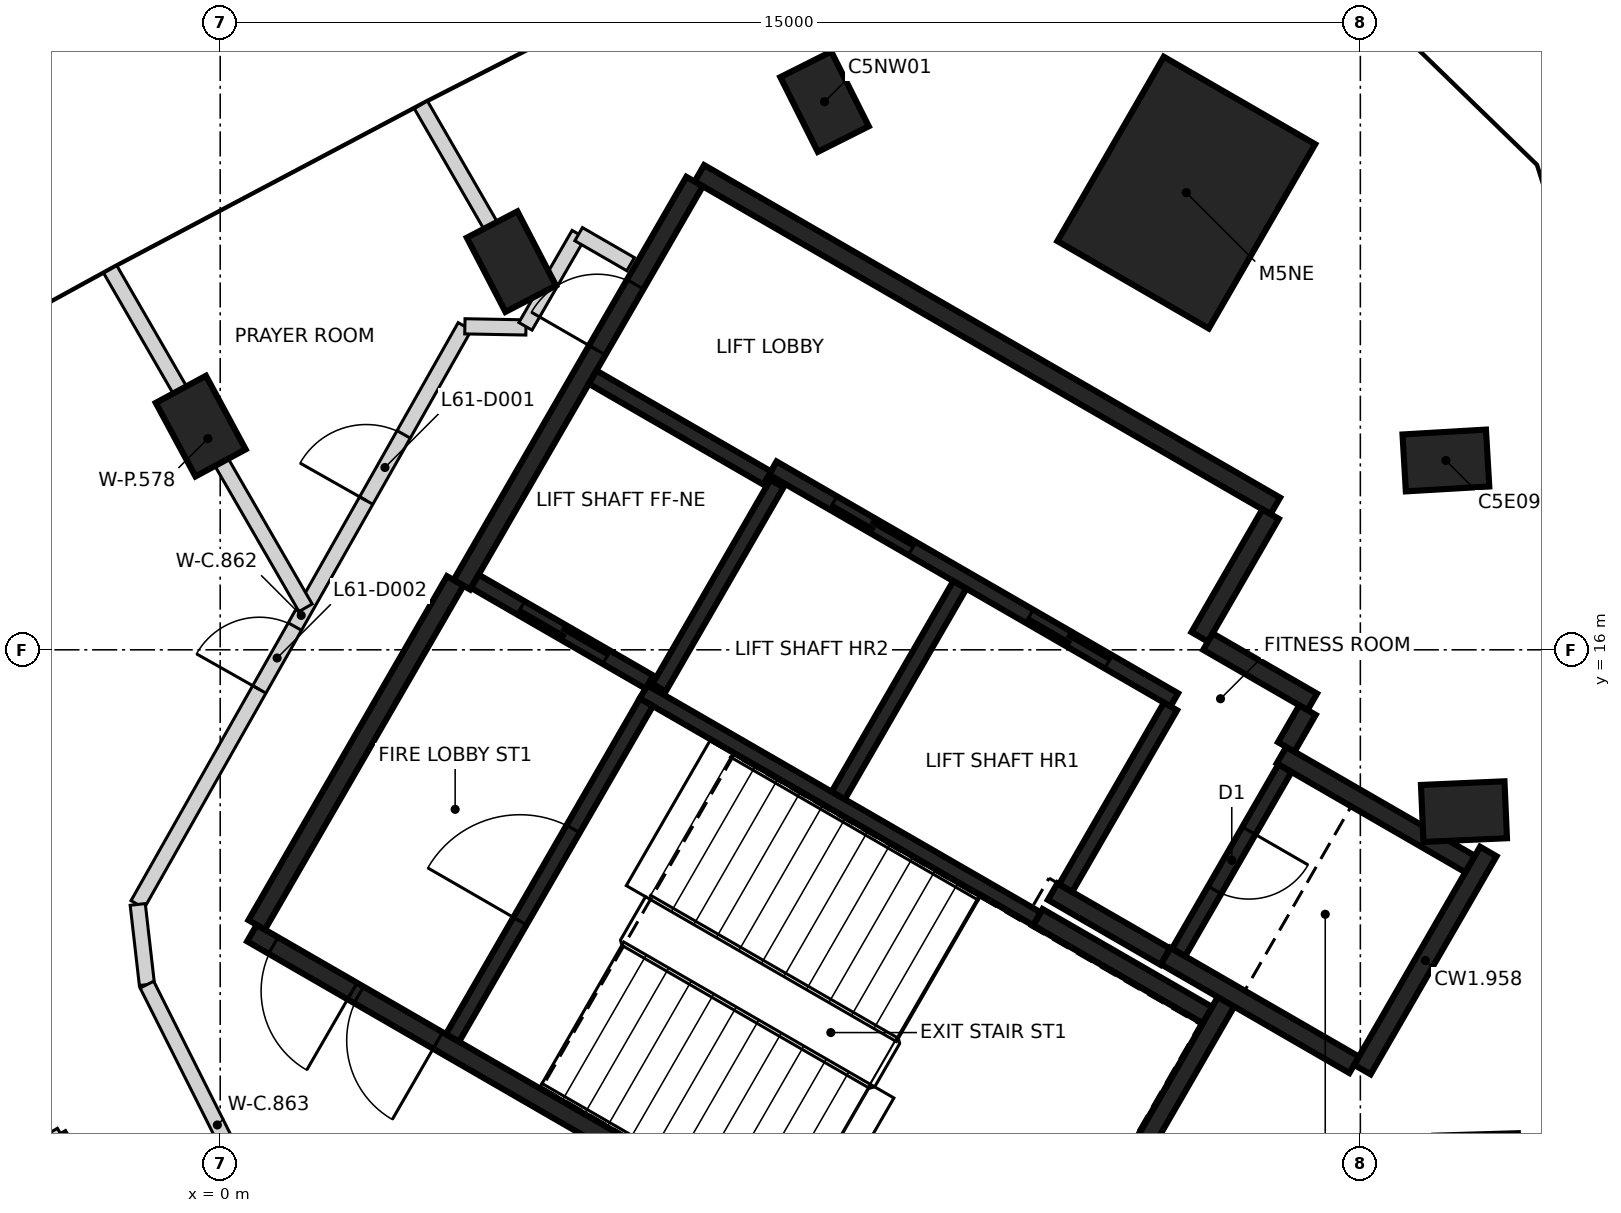
"""IFC4 building model, lengths in metres.
Left out: names, types, materials, properties, quantities, classifications, styles, units other than length and angle.
Written with IfcOpenShell. Run it as: python <this file> out.ifc"""

import sys

from ifc_helpers import new_model, si_unit, direction, frame, frame_2d, origin, origin_2d, place, context, subcontext, project, spatial, rectangle, extrude, element, fill, save


model = new_model("IFC4")
c1 = context("Model", 3, precision=1e-05, world=origin(), true_north=direction((0.0, 1.0)))
c2 = subcontext(c1, "Body", "Model", "MODEL_VIEW")
j1 = project(units=[si_unit("LENGTHUNIT", "METRE"), si_unit("PLANEANGLEUNIT", "RADIAN")], contexts=[c1])
p1 = place(None, origin())
s1 = spatial("IfcSite", under=j1, at=p1, CompositionType="ELEMENT")
p2 = place(p1, origin())
s2 = spatial("IfcBuilding", under=s1, at=p2, CompositionType="ELEMENT")
p3 = place(p2, frame((0.0, 0.0, 243.0)))
s3 = spatial("IfcBuildingStorey", under=s2, at=p3, CompositionType="ELEMENT", Elevation=243.0)
for number, where, z_axis, x_axis in (
    (1, (16.363, 13.872, -0.35), (0.0, 0.0, 1.0), (0.999, 0.044, 0.0)),
    (2, (16.125, 18.491, -0.35), (0.0, 0.0, 1.0), (0.998, 0.058, 0.0)),
    (3, (7.951, 23.211, -0.35), (0.0, 0.0, 1.0), (-0.449, 0.894, 0.0)),
    (4, (3.832, 21.107, -0.35), (0.0, 0.0, 1.0), (-0.461, 0.887, 0.0)),
    (5, (-0.256, 18.943, -0.35), (0.0, 0.0, 1.0), (-0.475, 0.88, 0.0)),
):
    element("IfcColumn", number, at=place(p3, frame(where, z_axis=z_axis, x_axis=x_axis)), inside=s3, PredefinedType="COLUMN", context=c2, shape_type="SweptSolid", body=[
        extrude(rectangle(XDim=1.1, YDim=0.75, at=origin_2d()), origin(), (0.0, 0.0, 1.0), 3.6),
    ])
p4 = place(p3, frame((12.71, 22.015, -0.35), z_axis=(0.0, 0.0, 1.0), x_axis=(0.5, 0.866025403784, 0.0)))
e6 = element("IfcColumn", 6, at=p4, inside=s3, PredefinedType="COLUMN", context=c2, shape_type="SweptSolid", body=[
    extrude(rectangle(XDim=2.8, YDim=2.3, at=origin_2d()), origin(), (0.0, 0.0, 1.0), 3.6),
])
p5 = place(p3, frame((10.42, 6.498, 0.0), z_axis=(0.0, 0.0, 1.0), x_axis=(-0.866021906294, 0.500006057782, 0.0)))
e7 = element("IfcWall", 7, at=p5, inside=s3, PredefinedType="SHEAR", context=c2, shape_type="SweptSolid", body=[
    extrude(rectangle(XDim=11.55, YDim=0.25, at=frame_2d((5.775, 0.0))), origin(), (0.0, 0.0, 1.0), 3.25),
])
p6 = place(p5, frame((10.025, 0.0, 0.0)))
e8 = element("IfcOpeningElement", 8, at=p6, cuts=e7, PredefinedType="OPENING", context=c2, shape_type="SweptSolid", body=[
    extrude(rectangle(XDim=1.2, YDim=2.1, at=frame_2d((0.6, 1.05))), frame((0.0, 0.135, 0.0), z_axis=(0.0, -1.0, 0.0), x_axis=(1.0, 0.0, 0.0)), (0.0, 0.0, 1.0), 0.27),
])
p7 = place(p5, frame((8.725, 0.0, 0.0)))
e9 = element("IfcOpeningElement", 9, at=p7, cuts=e7, PredefinedType="OPENING", context=c2, shape_type="SweptSolid", body=[
    extrude(rectangle(XDim=1.2, YDim=2.1, at=frame_2d((0.6, 1.05))), frame((0.0, 0.135, 0.0), z_axis=(0.0, -1.0, 0.0), x_axis=(1.0, 0.0, 0.0)), (0.0, 0.0, 1.0), 0.27),
])
p8 = place(p3, frame((6.304, 22.269, 0.0), z_axis=(0.0, 0.0, 1.0), x_axis=(0.866022959057, -0.500004234368, 0.0)))
e10 = element("IfcWall", 10, at=p8, inside=s3, PredefinedType="SHEAR", context=c2, shape_type="SweptSolid", body=[
    extrude(rectangle(XDim=8.75, YDim=0.25, at=frame_2d((4.375, 0.0))), origin(), (0.0, 0.0, 1.0), 3.25),
])
p9 = place(p3, frame((3.179, 16.856, 0.0), z_axis=(0.0, 0.0, 1.0), x_axis=(0.500001955336, 0.866024274868, 0.0)))
e11 = element("IfcWall", 11, at=p9, inside=s3, PredefinedType="SHEAR", context=c2, shape_type="SweptSolid", body=[
    extrude(rectangle(XDim=6.125, YDim=0.25, at=frame_2d((3.062, 0.0))), origin(), (0.0, 0.0, 1.0), 3.25),
])
p10 = place(p9, frame((3.563, 0.0, 0.0)))
e12 = element("IfcOpeningElement", 12, at=p10, cuts=e11, PredefinedType="OPENING", context=c2, shape_type="SweptSolid", body=[
    extrude(rectangle(XDim=1.0, YDim=2.1, at=frame_2d((0.5, 1.05))), frame((0.0, 0.135, 0.0), z_axis=(0.0, -1.0, 0.0), x_axis=(1.0, 0.0, 0.0)), (0.0, 0.0, 1.0), 0.27),
])
p11 = place(p3, frame((0.48, 12.381, 0.0), z_axis=(0.0, 0.0, 1.0), x_axis=(0.49999885962, 0.866026062182, 0.0)))
e13 = element("IfcWall", 13, at=p11, inside=s3, PredefinedType="SHEAR", context=c2, shape_type="SweptSolid", body=[
    extrude(rectangle(XDim=5.225, YDim=0.25, at=frame_2d((2.612, 0.0))), origin(), (0.0, 0.0, 1.0), 3.25),
])
p12 = place(p3, frame((13.238, 11.378, 0.0), z_axis=(0.0, 0.0, 1.0), x_axis=(-0.500008851346, -0.866020293397, 0.0)))
e14 = element("IfcWall", 14, at=p12, inside=s3, PredefinedType="SHEAR", context=c2, shape_type="SweptSolid", body=[
    extrude(rectangle(XDim=5.51, YDim=0.25, at=frame_2d((2.755, 0.0))), origin(), (0.0, 0.0, 1.0), 3.25),
])
p13 = place(p3, frame((16.684, 13.347, 0.0), z_axis=(0.0, 0.0, 1.0), x_axis=(-0.499998874531, -0.866026053573, 0.0)))
e15 = element("IfcWall", 15, at=p13, inside=s3, PredefinedType="SHEAR", context=c2, shape_type="SweptSolid", body=[
    extrude(rectangle(XDim=3.313, YDim=0.25, at=frame_2d((1.656, 0.0))), origin(), (0.0, 0.0, 1.0), 3.25),
])
p14 = place(p3, frame((14.918, 10.54, 0.0), z_axis=(0.0, 0.0, 1.0), x_axis=(-0.866063538972, 0.499933942099, 0.0)))
e16 = element("IfcWall", 16, at=p14, inside=s3, PredefinedType="SHEAR", context=c2, shape_type="SweptSolid", body=[
    extrude(rectangle(XDim=2.865, YDim=0.25, at=frame_2d((1.432, 0.0))), origin(), (0.0, 0.0, 1.0), 3.25),
])
p15 = place(p3, frame((13.963, 14.614, 0.0), z_axis=(0.0, 0.0, 1.0), x_axis=(0.866042235819, -0.499970844928, 0.0)))
e17 = element("IfcWall", 17, at=p15, inside=s3, PredefinedType="SHEAR", context=c2, shape_type="SweptSolid", body=[
    extrude(rectangle(XDim=2.865, YDim=0.25, at=frame_2d((1.432, 0.0))), origin(), (0.0, 0.0, 1.0), 3.25),
])
p16 = place(p3, frame((10.757, 12.481, 0.0), z_axis=(0.0, 0.0, 1.0), x_axis=(0.866022940537, -0.500004266446, 0.0)))
e18 = element("IfcWall", 18, at=p16, inside=s3, PredefinedType="SHEAR", context=c2, shape_type="SweptSolid", body=[
    extrude(rectangle(XDim=2.575, YDim=0.25, at=frame_2d((1.287, 0.0))), origin(), (0.0, 0.0, 1.0), 3.25),
])
p17 = place(p3, frame((13.819, 17.785, 0.0), z_axis=(0.0, 0.0, 1.0), x_axis=(-0.500039802285, -0.866002422705, 0.0)))
e19 = element("IfcWall", 19, at=p17, inside=s3, PredefinedType="SHEAR", context=c2, shape_type="SweptSolid", body=[
    extrude(rectangle(XDim=1.865, YDim=0.25, at=frame_2d((0.932, 0.0))), origin(), (0.0, 0.0, 1.0), 3.25),
])
p18 = place(p3, frame((12.433, 11.964, 0.0), z_axis=(0.0, 0.0, 1.0), x_axis=(-0.866038183914, 0.499977863513, 0.0)))
e20 = element("IfcWall", 20, at=p18, inside=s3, PredefinedType="SHEAR", context=c2, shape_type="SweptSolid", body=[
    extrude(rectangle(XDim=1.71, YDim=0.25, at=frame_2d((0.855, 0.0))), origin(), (0.0, 0.0, 1.0), 3.25),
])
p19 = place(p3, frame((12.995, 16.108, 0.0), z_axis=(0.0, 0.0, 1.0), x_axis=(0.866044474677, -0.49996696679, 0.0)))
e21 = element("IfcWall", 21, at=p19, inside=s3, PredefinedType="SHEAR", context=c2, shape_type="SweptSolid", body=[
    extrude(rectangle(XDim=1.584, YDim=0.25, at=frame_2d((0.792, 0.0))), origin(), (0.0, 0.0, 1.0), 3.25),
])
p20 = place(p3, frame((14.305, 15.207, 0.0), z_axis=(0.0, 0.0, 1.0), x_axis=(-0.499848422343, -0.866112899501, 0.0)))
e22 = element("IfcWall", 22, at=p20, inside=s3, PredefinedType="SHEAR", context=c2, shape_type="SweptSolid", body=[
    extrude(rectangle(XDim=0.559, YDim=0.25, at=frame_2d((0.28, 0.0))), origin(), (0.0, 0.0, 1.0), 3.25),
])
p21 = place(p3, frame((12.552, 15.342, 0.0), z_axis=(0.0, 0.0, 1.0), x_axis=(-0.866030299012, 0.499991521122, 0.0)))
e23 = element("IfcWall", 23, at=p21, inside=s3, PredefinedType="SHEAR", context=c2, shape_type="SweptSolid", body=[
    extrude(rectangle(XDim=6.1, YDim=0.2, at=frame_2d((3.05, 0.0))), origin(), (0.0, 0.0, 1.0), 3.25),
])
p22 = place(p21, frame((1.0, 0.0, 0.0)))
e24 = element("IfcOpeningElement", 24, at=p22, cuts=e23, PredefinedType="OPENING", context=c2, shape_type="SweptSolid", body=[
    extrude(rectangle(XDim=1.2, YDim=2.1, at=frame_2d((0.6, 1.05))), frame((0.0, 0.11, 0.0), z_axis=(0.0, -1.0, 0.0), x_axis=(1.0, 0.0, 0.0)), (0.0, 0.0, 1.0), 0.22),
])
p23 = place(p21, frame((3.982, 0.0, 0.0)))
e25 = element("IfcOpeningElement", 25, at=p23, cuts=e23, PredefinedType="OPENING", context=c2, shape_type="SweptSolid", body=[
    extrude(rectangle(XDim=1.2, YDim=2.1, at=frame_2d((0.6, 1.05))), frame((0.0, 0.11, 0.0), z_axis=(0.0, -1.0, 0.0), x_axis=(1.0, 0.0, 0.0)), (0.0, 0.0, 1.0), 0.22),
])
p24 = place(p3, frame((10.743, 12.46, 0.0), z_axis=(0.0, 0.0, 1.0), x_axis=(-0.866018848283, 0.500011354289, 0.0)))
e26 = element("IfcWall", 26, at=p24, inside=s3, PredefinedType="SHEAR", context=c2, shape_type="SweptSolid", body=[
    extrude(rectangle(XDim=5.974, YDim=0.2, at=frame_2d((2.987, 0.0))), origin(), (0.0, 0.0, 1.0), 3.25),
])
p25 = place(p3, frame((3.057, 10.895, 0.0), z_axis=(0.0, 0.0, 1.0), x_axis=(0.500027839223, 0.866009330205, 0.0)))
e27 = element("IfcWall", 27, at=p25, inside=s3, PredefinedType="SHEAR", context=c2, shape_type="SweptSolid", body=[
    extrude(rectangle(XDim=5.098, YDim=0.2, at=frame_2d((2.549, 0.0))), origin(), (0.0, 0.0, 1.0), 3.25),
])
p26 = place(p25, frame((1.774, 0.0, 0.0)))
e28 = element("IfcOpeningElement", 28, at=p26, cuts=e27, PredefinedType="OPENING", context=c2, shape_type="SweptSolid", body=[
    extrude(rectangle(XDim=1.4, YDim=2.1, at=frame_2d((0.7, 1.05))), frame((0.0, 0.11, 0.0), z_axis=(0.0, -1.0, 0.0), x_axis=(1.0, 0.0, 0.0)), (0.0, 0.0, 1.0), 0.22),
])
p27 = place(p3, frame((8.132, 14.084, 0.0), z_axis=(0.0, 0.0, 1.0), x_axis=(0.500030834389, 0.86600760081, 0.0)))
e29 = element("IfcWall", 29, at=p27, inside=s3, PredefinedType="SHEAR", context=c2, shape_type="SweptSolid", body=[
    extrude(rectangle(XDim=3.198, YDim=0.2, at=frame_2d((1.599, 0.0))), origin(), (0.0, 0.0, 1.0), 3.25),
])
p28 = place(p3, frame((14.008, 14.442, 0.0), z_axis=(0.0, 0.0, 1.0), x_axis=(-0.499986818241, -0.866033014143, 0.0)))
e30 = element("IfcWall", 30, at=p28, inside=s3, PredefinedType="SHEAR", context=c2, shape_type="SweptSolid", body=[
    extrude(rectangle(XDim=2.798, YDim=0.2, at=frame_2d((1.399, 0.0))), origin(), (0.0, 0.0, 1.0), 3.25),
])
p29 = place(p28, frame((0.949, 0.0, 0.0)))
e31 = element("IfcOpeningElement", 31, at=p29, cuts=e30, PredefinedType="OPENING", context=c2, shape_type="SweptSolid", body=[
    extrude(rectangle(XDim=0.9, YDim=2.1, at=frame_2d((0.45, 1.05))), frame((0.0, 0.11, 0.0), z_axis=(0.0, -1.0, 0.0), x_axis=(1.0, 0.0, 0.0)), (0.0, 0.0, 1.0), 0.22),
])
p30 = place(p3, frame((12.502, 15.255, 0.0), z_axis=(0.0, 0.0, 1.0), x_axis=(-0.499965018551, -0.866045599391, 0.0)))
e32 = element("IfcWall", 32, at=p30, inside=s3, PredefinedType="SHEAR", context=c2, shape_type="SweptSolid", body=[
    extrude(rectangle(XDim=2.759, YDim=0.2, at=frame_2d((1.379, 0.0))), origin(), (0.0, 0.0, 1.0), 3.25),
])
p31 = place(p3, frame((7.324, 18.187, 0.0), z_axis=(0.0, 0.0, 1.0), x_axis=(-0.499967891604, -0.866043940782, 0.0)))
e33 = element("IfcWall", 33, at=p31, inside=s3, PredefinedType="SHEAR", context=c2, shape_type="SweptSolid", body=[
    extrude(rectangle(XDim=3.1, YDim=0.2, at=frame_2d((1.55, 0.0))), origin(), (0.0, 0.0, 1.0), 3.25),
])
p32 = place(p3, frame((5.646, 15.576, 0.0), z_axis=(0.0, 0.0, 1.0), x_axis=(-0.866018407898, 0.500012117035, 0.0)))
e34 = element("IfcWall", 34, at=p32, inside=s3, PredefinedType="SHEAR", context=c2, shape_type="SweptSolid", body=[
    extrude(rectangle(XDim=2.651, YDim=0.2, at=frame_2d((1.325, 0.0))), origin(), (0.0, 0.0, 1.0), 3.25),
])
p33 = place(p32, frame((0.652, 0.0, 0.0)))
e35 = element("IfcOpeningElement", 35, at=p33, cuts=e34, PredefinedType="OPENING", context=c2, shape_type="SweptSolid", body=[
    extrude(rectangle(XDim=1.3, YDim=2.1, at=frame_2d((0.65, 1.05))), frame((0.0, 0.11, 0.0), z_axis=(0.0, -1.0, 0.0), x_axis=(1.0, 0.0, 0.0)), (0.0, 0.0, 1.0), 0.22),
])
p34 = place(p3, frame((7.196, 18.26, 0.0), z_axis=(0.0, 0.0, 1.0), x_axis=(-0.866018407898, 0.500012117035, 0.0)))
e36 = element("IfcWall", 36, at=p34, inside=s3, PredefinedType="SHEAR", context=c2, shape_type="SweptSolid", body=[
    extrude(rectangle(XDim=2.651, YDim=0.2, at=frame_2d((1.325, 0.0))), origin(), (0.0, 0.0, 1.0), 3.25),
])
p35 = place(p3, frame((-1.086, 12.651, 0.0), z_axis=(0.0, 0.0, 1.0), x_axis=(0.492590234691, 0.870261374925, 0.0)))
e37 = element("IfcWall", 37, at=p35, inside=s3, PredefinedType="PARTITIONING", context=c2, shape_type="SweptSolid", body=[
    extrude(rectangle(XDim=8.738, YDim=0.2, at=frame_2d((4.369, 0.0))), origin(), (0.0, 0.0, 1.0), 3.25),
])
p36 = place(p35, frame((6.105, 0.0, 0.0)))
e38 = element("IfcOpeningElement", 38, at=p36, cuts=e37, PredefinedType="OPENING", context=c2, shape_type="SweptSolid", body=[
    extrude(rectangle(XDim=1.0, YDim=2.1, at=frame_2d((0.5, 1.05))), frame((0.0, 0.11, 0.0), z_axis=(0.0, -1.0, 0.0), x_axis=(1.0, 0.0, 0.0)), (0.0, 0.0, 1.0), 0.22),
])
p37 = place(p35, frame((3.25, 0.0, 0.0)))
e39 = element("IfcOpeningElement", 39, at=p37, cuts=e37, PredefinedType="OPENING", context=c2, shape_type="SweptSolid", body=[
    extrude(rectangle(XDim=0.95, YDim=2.1, at=frame_2d((0.475, 1.05))), frame((0.0, 0.11, 0.0), z_axis=(0.0, -1.0, 0.0), x_axis=(1.0, 0.0, 0.0)), (0.0, 0.0, 1.0), 0.22),
])
p38 = place(p3, frame((-1.085, 12.65, 0.0), z_axis=(0.0, 0.0, 1.0), x_axis=(0.113812454263, -0.993502252264, 0.0)))
e40 = element("IfcWall", 40, at=p38, inside=s3, PredefinedType="PARTITIONING", context=c2, shape_type="SweptSolid", body=[
    extrude(rectangle(XDim=1.062, YDim=0.2, at=frame_2d((0.531, 0.0))), origin(), (0.0, 0.0, 1.0), 3.25),
])
p39 = place(p3, frame((-0.964, 11.595, 0.0), z_axis=(0.0, 0.0, 1.0), x_axis=(0.448584236569, -0.893740556706, 0.0)))
e41 = element("IfcWall", 41, at=p39, inside=s3, PredefinedType="PARTITIONING", context=c2, shape_type="SweptSolid", body=[
    extrude(rectangle(XDim=4.131, YDim=0.2, at=frame_2d((2.065, 0.0))), origin(), (0.0, 0.0, 1.0), 3.25),
])
p40 = place(p3, frame((3.219, 20.256, 0.0), z_axis=(0.0, 0.0, 1.0), x_axis=(0.99982280377, -0.018824480363, 0.0)))
e42 = element("IfcWall", 42, at=p40, inside=s3, PredefinedType="PARTITIONING", context=c2, shape_type="SweptSolid", body=[
    extrude(rectangle(XDim=0.804, YDim=0.2, at=frame_2d((0.402, 0.0))), origin(), (0.0, 0.0, 1.0), 3.25),
])
p41 = place(p3, frame((4.016, 20.256, 0.0), z_axis=(0.0, 0.0, 1.0), x_axis=(0.500135180047, 0.865947343479, 0.0)))
e43 = element("IfcWall", 43, at=p41, inside=s3, PredefinedType="PARTITIONING", context=c2, shape_type="SweptSolid", body=[
    extrude(rectangle(XDim=1.399, YDim=0.2, at=frame_2d((0.7, 0.0))), origin(), (0.0, 0.0, 1.0), 2.35),
])
p42 = place(p3, frame((4.716, 21.468, 0.0), z_axis=(0.0, 0.0, 1.0), x_axis=(0.865912682783, -0.500195187698, 0.0)))
e44 = element("IfcWall", 44, at=p42, inside=s3, PredefinedType="PARTITIONING", context=c2, shape_type="SweptSolid", body=[
    extrude(rectangle(XDim=0.79, YDim=0.2, at=frame_2d((0.395, 0.0))), origin(), (0.0, 0.0, 1.0), 2.35),
])
p43 = place(p3, frame((-1.447, 21.005, 0.0), z_axis=(0.0, 0.0, 1.0), x_axis=(0.49988826685, -0.866089903339, 0.0)))
e45 = element("IfcWall", 45, at=p43, inside=s3, PredefinedType="PARTITIONING", context=c2, shape_type="SweptSolid", body=[
    extrude(rectangle(XDim=5.141, YDim=0.2, at=frame_2d((2.57, 0.0))), origin(), (0.0, 0.0, 1.0), 3.25),
])
p44 = place(p3, frame((2.64, 23.17, 0.0), z_axis=(0.0, 0.0, 1.0), x_axis=(0.49992507759, -0.866068655937, 0.0)))
e46 = element("IfcWall", 46, at=p44, inside=s3, PredefinedType="PARTITIONING", context=c2, shape_type="SweptSolid", body=[
    extrude(rectangle(XDim=2.712, YDim=0.2, at=frame_2d((1.356, 0.0))), origin(), (0.0, 0.0, 1.0), 3.25),
])
p45 = place(p3, frame((-7.298, 6.641, 0.0), z_axis=(0.0, 0.0, 1.0), x_axis=(0.865999837459, 0.50004427956, 0.0)))
e47 = element("IfcWall", 47, at=p45, inside=s3, PredefinedType="PARTITIONING", context=c2, shape_type="SweptSolid", body=[
    extrude(rectangle(XDim=5.998, YDim=0.15, at=frame_2d((2.999, 0.0))), origin(), (0.0, 0.0, 1.0), 3.25),
])
p46 = place(p3, frame((-2.1, 9.638, 0.0), z_axis=(0.0, 0.0, 1.0), x_axis=(0.499753046638, -0.866167935435, 0.0)))
e48 = element("IfcWall", 48, at=p46, inside=s3, PredefinedType="PARTITIONING", context=c2, shape_type="SweptSolid", body=[
    extrude(rectangle(XDim=2.994, YDim=0.15, at=frame_2d((1.497, 0.0))), origin(), (0.0, 0.0, 1.0), 3.25),
])
p47 = place(p46, frame((1.096, 0.0, 0.0)))
e49 = element("IfcOpeningElement", 49, at=p47, cuts=e48, PredefinedType="OPENING", context=c2, shape_type="SweptSolid", body=[
    extrude(rectangle(XDim=0.8, YDim=2.1, at=frame_2d((0.4, 1.05))), frame((0.0, 0.085, 0.0), z_axis=(0.0, -1.0, 0.0), x_axis=(1.0, 0.0, 0.0)), (0.0, 0.0, 1.0), 0.17),
])
p48 = place(p33, origin())
e50 = element("IfcDoor", 50, at=p48, inside=s3, OperationType="SLIDING_TO_RIGHT", PredefinedType="DOOR", context=c2, shape_type="SweptSolid", body=[
    extrude(rectangle(XDim=1.3, YDim=2.1, at=frame_2d((0.65, 1.05))), frame((0.0, 0.025, 0.0), z_axis=(0.0, -1.0, 0.0), x_axis=(1.0, 0.0, 0.0)), (0.0, 0.0, 1.0), 0.05),
])
fill(e35, e50)
p49 = place(p22, origin())
e51 = element("IfcDoor", 51, at=p49, inside=s3, OperationType="DOUBLE_DOOR_SLIDING", PredefinedType="DOOR", context=c2, shape_type="SweptSolid", body=[
    extrude(rectangle(XDim=1.2, YDim=2.1, at=frame_2d((0.6, 1.05))), frame((0.0, 0.025, 0.0), z_axis=(0.0, -1.0, 0.0), x_axis=(1.0, 0.0, 0.0)), (0.0, 0.0, 1.0), 0.05),
])
fill(e24, e51)
p50 = place(p23, origin())
e52 = element("IfcDoor", 52, at=p50, inside=s3, OperationType="DOUBLE_DOOR_SLIDING", PredefinedType="DOOR", context=c2, shape_type="SweptSolid", body=[
    extrude(rectangle(XDim=1.2, YDim=2.1, at=frame_2d((0.6, 1.05))), frame((0.0, 0.025, 0.0), z_axis=(0.0, -1.0, 0.0), x_axis=(1.0, 0.0, 0.0)), (0.0, 0.0, 1.0), 0.05),
])
fill(e25, e52)
p51 = place(p10, origin())
e53 = element("IfcDoor", 53, at=p51, inside=s3, OperationType="SINGLE_SWING_LEFT", PredefinedType="DOOR", context=c2, shape_type="SweptSolid", body=[
    extrude(rectangle(XDim=1.0, YDim=2.1, at=frame_2d((0.5, 1.05))), frame((0.0, 0.025, 0.0), z_axis=(0.0, -1.0, 0.0), x_axis=(1.0, 0.0, 0.0)), (0.0, 0.0, 1.0), 0.05),
])
fill(e12, e53)
p52 = place(p6, origin())
e54 = element("IfcDoor", 54, at=p52, inside=s3, OperationType="SINGLE_SWING_LEFT", PredefinedType="DOOR", context=c2, shape_type="SweptSolid", body=[
    extrude(rectangle(XDim=1.2, YDim=2.1, at=frame_2d((0.6, 1.05))), frame((0.0, 0.025, 0.0), z_axis=(0.0, -1.0, 0.0), x_axis=(1.0, 0.0, 0.0)), (0.0, 0.0, 1.0), 0.05),
])
fill(e8, e54)
p53 = place(p7, origin())
e55 = element("IfcDoor", 55, at=p53, inside=s3, OperationType="SINGLE_SWING_RIGHT", PredefinedType="DOOR", context=c2, shape_type="SweptSolid", body=[
    extrude(rectangle(XDim=1.2, YDim=2.1, at=frame_2d((0.6, 1.05))), frame((0.0, 0.025, 0.0), z_axis=(0.0, -1.0, 0.0), x_axis=(1.0, 0.0, 0.0)), (0.0, 0.0, 1.0), 0.05),
])
fill(e9, e55)
p54 = place(p26, origin())
e56 = element("IfcDoor", 56, at=p54, inside=s3, OperationType="SINGLE_SWING_RIGHT", PredefinedType="DOOR", context=c2, shape_type="SweptSolid", body=[
    extrude(rectangle(XDim=1.4, YDim=2.1, at=frame_2d((0.7, 1.05))), frame((0.0, 0.025, 0.0), z_axis=(0.0, -1.0, 0.0), x_axis=(1.0, 0.0, 0.0)), (0.0, 0.0, 1.0), 0.05),
])
fill(e28, e56)
p55 = place(p29, origin())
e57 = element("IfcDoor", 57, at=p55, inside=s3, OperationType="SINGLE_SWING_LEFT", PredefinedType="DOOR", context=c2, shape_type="SweptSolid", body=[
    extrude(rectangle(XDim=0.9, YDim=2.1, at=frame_2d((0.45, 1.05))), frame((0.0, 0.025, 0.0), z_axis=(0.0, -1.0, 0.0), x_axis=(1.0, 0.0, 0.0)), (0.0, 0.0, 1.0), 0.05),
])
fill(e31, e57)
p56 = place(p36, origin())
e58 = element("IfcDoor", 58, at=p56, inside=s3, OperationType="SINGLE_SWING_LEFT", PredefinedType="DOOR", context=c2, shape_type="SweptSolid", body=[
    extrude(rectangle(XDim=1.0, YDim=2.1, at=frame_2d((0.5, 1.05))), frame((0.0, 0.025, 0.0), z_axis=(0.0, -1.0, 0.0), x_axis=(1.0, 0.0, 0.0)), (0.0, 0.0, 1.0), 0.05),
])
fill(e38, e58)
p57 = place(p37, origin())
e59 = element("IfcDoor", 59, at=p57, inside=s3, OperationType="SINGLE_SWING_LEFT", PredefinedType="DOOR", context=c2, shape_type="SweptSolid", body=[
    extrude(rectangle(XDim=0.95, YDim=2.1, at=frame_2d((0.475, 1.05))), frame((0.0, 0.025, 0.0), z_axis=(0.0, -1.0, 0.0), x_axis=(1.0, 0.0, 0.0)), (0.0, 0.0, 1.0), 0.05),
])
fill(e39, e59)
save(model, sys.argv[1])
